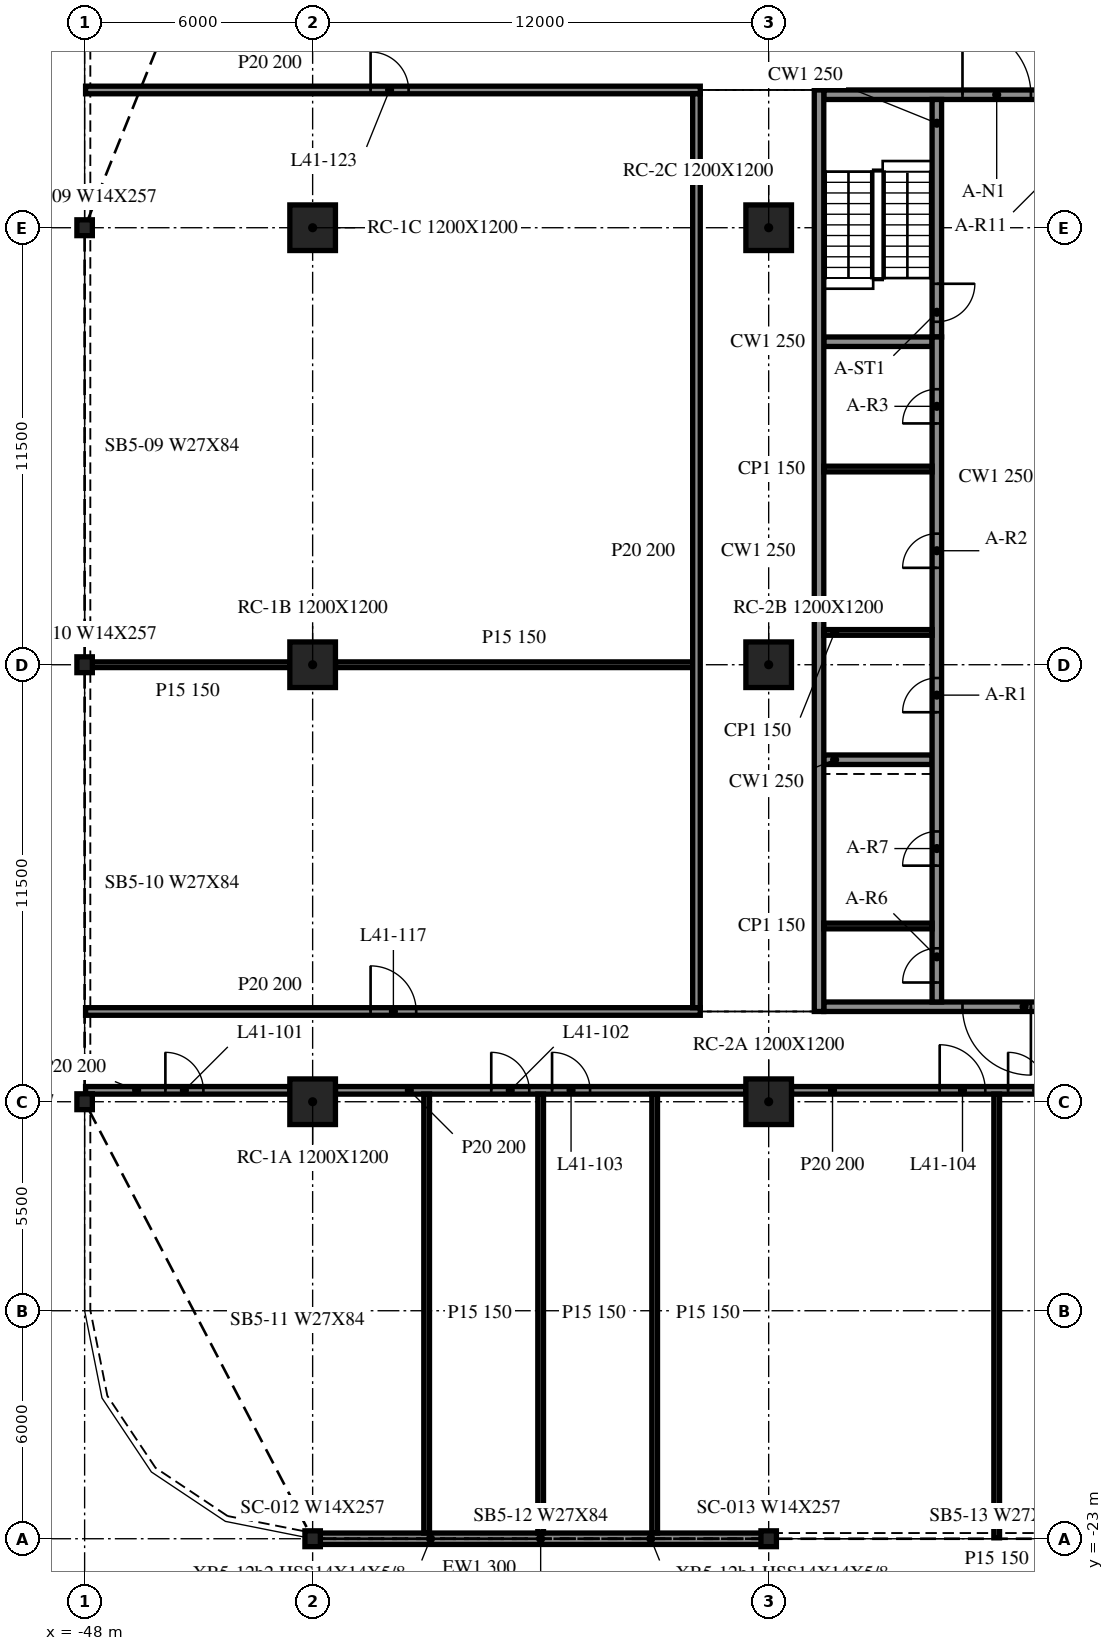
"""IFC4 building model, lengths in metres.
Left out: names, types, materials, properties, quantities, classifications, styles, units other than length and angle.
Written with IfcOpenShell. Run it as: python <this file> out.ifc"""

import sys

from ifc_helpers import new_model, si_unit, direction, frame, frame_2d, origin, origin_2d, place, context, subcontext, project, spatial, rectangle, i_section, extrude, element, fill, save


model = new_model("IFC4")
c1 = context("Model", 3, precision=1e-05, world=origin(), true_north=direction((0.0, 1.0)))
c2 = subcontext(c1, "Body", "Model", "MODEL_VIEW")
j1 = project(units=[si_unit("LENGTHUNIT", "METRE"), si_unit("PLANEANGLEUNIT", "RADIAN")], contexts=[c1])
p1 = place(None, origin())
s1 = spatial("IfcSite", under=j1, at=p1, CompositionType="ELEMENT")
p2 = place(p1, origin())
s2 = spatial("IfcBuilding", under=s1, at=p2, CompositionType="ELEMENT")
p3 = place(p2, frame((0.0, 0.0, 174.4)))
s3 = spatial("IfcBuildingStorey", under=s2, at=p3, CompositionType="ELEMENT", Elevation=174.4)
for number, where, z_axis, x_axis in (
    (1, (-42.0, -11.5, -0.34), (0.0, 0.0, 1.0), (1.0, 0.0, 0.0)),
    (2, (-42.0, 0.0, -0.34), (0.0, 0.0, 1.0), (1.0, 0.0, 0.0)),
    (3, (-42.0, 11.5, -0.34), (0.0, 0.0, 1.0), (1.0, 0.0, 0.0)),
    (4, (-30.0, -11.5, -0.34), (0.0, 0.0, 1.0), (1.0, 0.0, 0.0)),
    (5, (-30.0, 0.0, -0.34), (0.0, 0.0, 1.0), (1.0, 0.0, 0.0)),
    (6, (-30.0, 11.5, -0.34), (0.0, 0.0, 1.0), (1.0, 0.0, 0.0)),
):
    element("IfcColumn", number, at=place(p3, frame(where, z_axis=z_axis, x_axis=x_axis)), inside=s3, PredefinedType="COLUMN", context=c2, shape_type="SweptSolid", body=[
        extrude(rectangle(XDim=1.2, YDim=1.2, at=origin_2d()), origin(), (0.0, 0.0, 1.0), 3.8),
    ])
for number, where, z_axis, x_axis in (
    (7, (-48.0, 11.5, -0.34), (0.0, 0.0, 1.0), (1.0, 0.0, 0.0)),
    (8, (-48.0, 0.0, -0.34), (0.0, 0.0, 1.0), (1.0, 0.0, 0.0)),
    (9, (-48.0, -11.5, -0.34), (0.0, 0.0, 1.0), (1.0, 0.0, 0.0)),
    (10, (-42.0, -23.0, -0.34), (0.0, 0.0, 1.0), (1.0, 0.0, 0.0)),
    (11, (-30.0, -23.0, -0.34), (0.0, 0.0, 1.0), (1.0, 0.0, 0.0)),
):
    element("IfcColumn", number, at=place(p3, frame(where, z_axis=z_axis, x_axis=x_axis)), inside=s3, PredefinedType="COLUMN", context=c2, shape_type="SweptSolid", body=[
        extrude(i_section(OverallWidth=0.406, OverallDepth=0.417, WebThickness=0.03, FlangeThickness=0.048, at=origin_2d()), origin(), (0.0, 0.0, 1.0), 3.8),
    ])
p4 = place(p3, frame((-41.985, -23.0, 0.0), z_axis=(0.0, 0.0, 1.0), x_axis=(1.0, 0.0, 0.0)))
e12 = element("IfcWall", 12, at=p4, inside=s3, PredefinedType="NOTDEFINED", context=c2, shape_type="SweptSolid", body=[
    extrude(rectangle(XDim=11.97, YDim=0.3, at=frame_2d((5.985, 0.0))), origin(), (0.0, 0.0, 1.0), 2.782),
])
p5 = place(p3, frame((-28.675, 15.125, 0.0), z_axis=(0.0, 0.0, 1.0), x_axis=(0.0, -1.0, 0.0)))
e13 = element("IfcWall", 13, at=p5, inside=s3, PredefinedType="SOLIDWALL", context=c2, shape_type="SweptSolid", body=[
    extrude(rectangle(XDim=24.25, YDim=0.25, at=frame_2d((12.125, 0.0))), origin(), (0.0, 0.0, 1.0), 3.46),
])
p6 = place(p3, frame((-19.45, -9.0, 0.0), z_axis=(0.0, 0.0, 1.0), x_axis=(-1.0, 0.0, 0.0)))
e14 = element("IfcWall", 14, at=p6, inside=s3, PredefinedType="SOLIDWALL", context=c2, shape_type="SweptSolid", body=[
    extrude(rectangle(XDim=9.1, YDim=0.25, at=frame_2d((4.55, 0.0))), origin(), (0.0, 0.0, 1.0), 3.46),
])
p7 = place(p6, frame((3.65, 0.0, 0.0)))
e15 = element("IfcOpeningElement", 15, at=p7, cuts=e14, PredefinedType="OPENING", context=c2, shape_type="SweptSolid", body=[
    extrude(rectangle(XDim=1.8, YDim=2.1, at=frame_2d((0.9, 1.05))), frame((0.0, 0.135, 0.0), z_axis=(0.0, -1.0, 0.0), x_axis=(1.0, 0.0, 0.0)), (0.0, 0.0, 1.0), 0.27),
])
p8 = place(p3, frame((-28.55, 15.0, 0.0), z_axis=(0.0, 0.0, 1.0), x_axis=(1.0, 0.0, 0.0)))
e16 = element("IfcWall", 16, at=p8, inside=s3, PredefinedType="SOLIDWALL", context=c2, shape_type="SweptSolid", body=[
    extrude(rectangle(XDim=9.1, YDim=0.25, at=frame_2d((4.55, 0.0))), origin(), (0.0, 0.0, 1.0), 3.46),
])
p9 = place(p8, frame((3.65, 0.0, 0.0)))
e17 = element("IfcOpeningElement", 17, at=p9, cuts=e16, PredefinedType="OPENING", context=c2, shape_type="SweptSolid", body=[
    extrude(rectangle(XDim=1.8, YDim=2.1, at=frame_2d((0.9, 1.05))), frame((0.0, 0.135, 0.0), z_axis=(0.0, -1.0, 0.0), x_axis=(1.0, 0.0, 0.0)), (0.0, 0.0, 1.0), 0.27),
])
p10 = place(p3, frame((-25.575, -8.875, 0.0), z_axis=(0.0, 0.0, 1.0), x_axis=(0.0, 1.0, 0.0)))
e18 = element("IfcWall", 18, at=p10, inside=s3, PredefinedType="SOLIDWALL", context=c2, shape_type="SweptSolid", body=[
    extrude(rectangle(XDim=17.5, YDim=0.25, at=frame_2d((8.75, 0.0))), origin(), (0.0, 0.0, 1.0), 3.46),
])
p11 = place(p10, frame((7.625, 0.0, 0.0)))
e19 = element("IfcOpeningElement", 19, at=p11, cuts=e18, PredefinedType="OPENING", context=c2, shape_type="SweptSolid", body=[
    extrude(rectangle(XDim=0.9, YDim=2.1, at=frame_2d((0.45, 1.05))), frame((0.0, 0.135, 0.0), z_axis=(0.0, -1.0, 0.0), x_axis=(1.0, 0.0, 0.0)), (0.0, 0.0, 1.0), 0.27),
])
p12 = place(p10, frame((11.425, 0.0, 0.0)))
e20 = element("IfcOpeningElement", 20, at=p12, cuts=e18, PredefinedType="OPENING", context=c2, shape_type="SweptSolid", body=[
    extrude(rectangle(XDim=0.9, YDim=2.1, at=frame_2d((0.45, 1.05))), frame((0.0, 0.135, 0.0), z_axis=(0.0, -1.0, 0.0), x_axis=(1.0, 0.0, 0.0)), (0.0, 0.0, 1.0), 0.27),
])
p13 = place(p10, frame((15.225, 0.0, 0.0)))
e21 = element("IfcOpeningElement", 21, at=p13, cuts=e18, PredefinedType="OPENING", context=c2, shape_type="SweptSolid", body=[
    extrude(rectangle(XDim=0.9, YDim=2.1, at=frame_2d((0.45, 1.05))), frame((0.0, 0.135, 0.0), z_axis=(0.0, -1.0, 0.0), x_axis=(1.0, 0.0, 0.0)), (0.0, 0.0, 1.0), 0.27),
])
p14 = place(p10, frame((0.512, 0.0, 0.0)))
e22 = element("IfcOpeningElement", 22, at=p14, cuts=e18, PredefinedType="OPENING", context=c2, shape_type="SweptSolid", body=[
    extrude(rectangle(XDim=0.9, YDim=2.1, at=frame_2d((0.45, 1.05))), frame((0.0, 0.135, 0.0), z_axis=(0.0, -1.0, 0.0), x_axis=(1.0, 0.0, 0.0)), (0.0, 0.0, 1.0), 0.27),
])
p15 = place(p10, frame((3.587, 0.0, 0.0)))
e23 = element("IfcOpeningElement", 23, at=p15, cuts=e18, PredefinedType="OPENING", context=c2, shape_type="SweptSolid", body=[
    extrude(rectangle(XDim=0.9, YDim=2.1, at=frame_2d((0.45, 1.05))), frame((0.0, 0.135, 0.0), z_axis=(0.0, -1.0, 0.0), x_axis=(1.0, 0.0, 0.0)), (0.0, 0.0, 1.0), 0.27),
])
p16 = place(p3, frame((-25.575, 14.875, 0.0), z_axis=(0.0, 0.0, 1.0), x_axis=(0.0, -1.0, 0.0)))
e24 = element("IfcWall", 24, at=p16, inside=s3, PredefinedType="SOLIDWALL", context=c2, shape_type="SweptSolid", body=[
    extrude(rectangle(XDim=6.25, YDim=0.25, at=frame_2d((3.125, 0.0))), origin(), (0.0, 0.0, 1.0), 3.46),
])
p17 = place(p16, frame((4.85, 0.0, 0.0)))
e25 = element("IfcOpeningElement", 25, at=p17, cuts=e24, PredefinedType="OPENING", context=c2, shape_type="SweptSolid", body=[
    extrude(rectangle(XDim=1.0, YDim=2.1, at=frame_2d((0.5, 1.05))), frame((0.0, 0.135, 0.0), z_axis=(0.0, -1.0, 0.0), x_axis=(1.0, 0.0, 0.0)), (0.0, 0.0, 1.0), 0.27),
])
for number, where, z_axis, x_axis in (
    (26, (-28.55, -2.5, 0.0), (0.0, 0.0, 1.0), (1.0, 0.0, 0.0)),
    (27, (-28.55, 8.5, 0.0), (0.0, 0.0, 1.0), (1.0, 0.0, 0.0)),
):
    element("IfcWall", number, at=place(p3, frame(where, z_axis=z_axis, x_axis=x_axis)), inside=s3, PredefinedType="SOLIDWALL", context=c2, shape_type="SweptSolid", body=[
        extrude(rectangle(XDim=2.85, YDim=0.25, at=frame_2d((1.425, 0.0))), origin(), (0.0, 0.0, 1.0), 3.46),
    ])
for number, where, z_axis, x_axis in (
    (28, (-28.55, 0.85, 0.0), (0.0, 0.0, 1.0), (1.0, 0.0, 0.0)),
    (29, (-28.55, 5.15, 0.0), (0.0, 0.0, 1.0), (1.0, 0.0, 0.0)),
    (30, (-28.55, -6.875, 0.0), (0.0, 0.0, 1.0), (1.0, 0.0, 0.0)),
):
    element("IfcWall", number, at=place(p3, frame(where, z_axis=z_axis, x_axis=x_axis)), inside=s3, PredefinedType="PARTITIONING", context=c2, shape_type="SweptSolid", body=[
        extrude(rectangle(XDim=2.85, YDim=0.15, at=frame_2d((1.425, 0.0))), origin(), (0.0, 0.0, 1.0), 3.46),
    ])
p18 = place(p3, frame((-47.975, -11.2, 0.0), z_axis=(0.0, 0.0, 1.0), x_axis=(1.0, 0.0, 0.0)))
e31 = element("IfcWall", 31, at=p18, inside=s3, PredefinedType="PARTITIONING", context=c2, shape_type="SweptSolid", body=[
    extrude(rectangle(XDim=5.375, YDim=0.2, at=frame_2d((2.688, 0.0))), origin(), (0.0, 0.0, 1.0), 3.46),
])
p19 = place(p18, frame((2.1, 0.0, 0.0)))
e32 = element("IfcOpeningElement", 32, at=p19, cuts=e31, PredefinedType="OPENING", context=c2, shape_type="SweptSolid", body=[
    extrude(rectangle(XDim=1.0, YDim=2.1, at=frame_2d((0.5, 1.05))), frame((0.0, 0.11, 0.0), z_axis=(0.0, -1.0, 0.0), x_axis=(1.0, 0.0, 0.0)), (0.0, 0.0, 1.0), 0.22),
])
p20 = place(p3, frame((-41.4, -11.2, 0.0), z_axis=(0.0, 0.0, 1.0), x_axis=(1.0, 0.0, 0.0)))
e33 = element("IfcWall", 33, at=p20, inside=s3, PredefinedType="PARTITIONING", context=c2, shape_type="SweptSolid", body=[
    extrude(rectangle(XDim=10.8, YDim=0.2, at=frame_2d((5.4, 0.0))), origin(), (0.0, 0.0, 1.0), 3.46),
])
p21 = place(p20, frame((4.1, 0.0, 0.0)))
e34 = element("IfcOpeningElement", 34, at=p21, cuts=e33, PredefinedType="OPENING", context=c2, shape_type="SweptSolid", body=[
    extrude(rectangle(XDim=1.0, YDim=2.1, at=frame_2d((0.5, 1.05))), frame((0.0, 0.11, 0.0), z_axis=(0.0, -1.0, 0.0), x_axis=(1.0, 0.0, 0.0)), (0.0, 0.0, 1.0), 0.22),
])
p22 = place(p20, frame((5.7, 0.0, 0.0)))
e35 = element("IfcOpeningElement", 35, at=p22, cuts=e33, PredefinedType="OPENING", context=c2, shape_type="SweptSolid", body=[
    extrude(rectangle(XDim=1.0, YDim=2.1, at=frame_2d((0.5, 1.05))), frame((0.0, 0.11, 0.0), z_axis=(0.0, -1.0, 0.0), x_axis=(1.0, 0.0, 0.0)), (0.0, 0.0, 1.0), 0.22),
])
p23 = place(p3, frame((-29.4, -11.2, 0.0), z_axis=(0.0, 0.0, 1.0), x_axis=(1.0, 0.0, 0.0)))
e36 = element("IfcWall", 36, at=p23, inside=s3, PredefinedType="PARTITIONING", context=c2, shape_type="SweptSolid", body=[
    extrude(rectangle(XDim=10.8, YDim=0.2, at=frame_2d((5.4, 0.0))), origin(), (0.0, 0.0, 1.0), 3.46),
])
p24 = place(p23, frame((3.9, 0.0, 0.0)))
e37 = element("IfcOpeningElement", 37, at=p24, cuts=e36, PredefinedType="OPENING", context=c2, shape_type="SweptSolid", body=[
    extrude(rectangle(XDim=1.2, YDim=2.1, at=frame_2d((0.6, 1.05))), frame((0.0, 0.11, 0.0), z_axis=(0.0, -1.0, 0.0), x_axis=(1.0, 0.0, 0.0)), (0.0, 0.0, 1.0), 0.22),
])
p25 = place(p23, frame((5.7, 0.0, 0.0)))
e38 = element("IfcOpeningElement", 38, at=p25, cuts=e36, PredefinedType="OPENING", context=c2, shape_type="SweptSolid", body=[
    extrude(rectangle(XDim=1.0, YDim=2.1, at=frame_2d((0.5, 1.05))), frame((0.0, 0.11, 0.0), z_axis=(0.0, -1.0, 0.0), x_axis=(1.0, 0.0, 0.0)), (0.0, 0.0, 1.0), 0.22),
])
p26 = place(p3, frame((-47.975, -9.125, 0.0), z_axis=(0.0, 0.0, 1.0), x_axis=(1.0, 0.0, 0.0)))
e39 = element("IfcWall", 39, at=p26, inside=s3, PredefinedType="PARTITIONING", context=c2, shape_type="SweptSolid", body=[
    extrude(rectangle(XDim=16.175, YDim=0.2, at=frame_2d((8.087, 0.0))), origin(), (0.0, 0.0, 1.0), 3.46),
])
p27 = place(p26, frame((7.5, 0.0, 0.0)))
e40 = element("IfcOpeningElement", 40, at=p27, cuts=e39, PredefinedType="OPENING", context=c2, shape_type="SweptSolid", body=[
    extrude(rectangle(XDim=1.2, YDim=2.1, at=frame_2d((0.6, 1.05))), frame((0.0, 0.11, 0.0), z_axis=(0.0, -1.0, 0.0), x_axis=(1.0, 0.0, 0.0)), (0.0, 0.0, 1.0), 0.22),
])
p28 = place(p3, frame((-47.975, 0.0, 0.0), z_axis=(0.0, 0.0, 1.0), x_axis=(1.0, 0.0, 0.0)))
e41 = element("IfcWall", 41, at=p28, inside=s3, PredefinedType="PARTITIONING", context=c2, shape_type="SweptSolid", body=[
    extrude(rectangle(XDim=5.375, YDim=0.15, at=frame_2d((2.688, 0.0))), origin(), (0.0, 0.0, 1.0), 3.46),
])
p29 = place(p3, frame((-41.4, 0.0, 0.0), z_axis=(0.0, 0.0, 1.0), x_axis=(1.0, 0.0, 0.0)))
e42 = element("IfcWall", 42, at=p29, inside=s3, PredefinedType="PARTITIONING", context=c2, shape_type="SweptSolid", body=[
    extrude(rectangle(XDim=9.4, YDim=0.15, at=frame_2d((4.7, 0.0))), origin(), (0.0, 0.0, 1.0), 3.46),
])
p30 = place(p3, frame((-47.975, 15.125, 0.0), z_axis=(0.0, 0.0, 1.0), x_axis=(1.0, 0.0, 0.0)))
e43 = element("IfcWall", 43, at=p30, inside=s3, PredefinedType="PARTITIONING", context=c2, shape_type="SweptSolid", body=[
    extrude(rectangle(XDim=16.175, YDim=0.2, at=frame_2d((8.087, 0.0))), origin(), (0.0, 0.0, 1.0), 3.46),
])
p31 = place(p30, frame((7.5, 0.0, 0.0)))
e44 = element("IfcOpeningElement", 44, at=p31, cuts=e43, PredefinedType="OPENING", context=c2, shape_type="SweptSolid", body=[
    extrude(rectangle(XDim=1.0, YDim=2.1, at=frame_2d((0.5, 1.05))), frame((0.0, 0.11, 0.0), z_axis=(0.0, -1.0, 0.0), x_axis=(1.0, 0.0, 0.0)), (0.0, 0.0, 1.0), 0.22),
])
for number, where, z_axis, x_axis in (
    (45, (-39.0, -22.85, 0.0), (0.0, 0.0, 1.0), (0.0, 1.0, 0.0)),
    (46, (-36.0, -22.85, 0.0), (0.0, 0.0, 1.0), (0.0, 1.0, 0.0)),
    (47, (-33.0, -22.85, 0.0), (0.0, 0.0, 1.0), (0.0, 1.0, 0.0)),
):
    element("IfcWall", number, at=place(p3, frame(where, z_axis=z_axis, x_axis=x_axis)), inside=s3, PredefinedType="PARTITIONING", context=c2, shape_type="SweptSolid", body=[
        extrude(rectangle(XDim=11.55, YDim=0.15, at=frame_2d((5.775, 0.0))), origin(), (0.0, 0.0, 1.0), 3.46),
    ])
p32 = place(p3, frame((-31.9, -9.025, 0.0), z_axis=(0.0, 0.0, 1.0), x_axis=(0.0, 1.0, 0.0)))
e48 = element("IfcWall", 48, at=p32, inside=s3, PredefinedType="PARTITIONING", context=c2, shape_type="SweptSolid", body=[
    extrude(rectangle(XDim=24.05, YDim=0.2, at=frame_2d((12.025, 0.0))), origin(), (0.0, 0.0, 1.0), 3.46),
])
p33 = place(p3, frame((-24.0, -22.975, 0.0), z_axis=(0.0, 0.0, 1.0), x_axis=(0.0, 1.0, 0.0)))
e49 = element("IfcWall", 49, at=p33, inside=s3, PredefinedType="PARTITIONING", context=c2, shape_type="SweptSolid", body=[
    extrude(rectangle(XDim=11.675, YDim=0.15, at=frame_2d((5.837, 0.0))), origin(), (0.0, 0.0, 1.0), 3.46),
])
p34 = place(p7, origin())
e50 = element("IfcDoor", 50, at=p34, inside=s3, OperationType="DOUBLE_DOOR_SINGLE_SWING", PredefinedType="DOOR", context=c2, shape_type="SweptSolid", body=[
    extrude(rectangle(XDim=1.8, YDim=2.1, at=frame_2d((0.9, 1.05))), frame((0.0, 0.025, 0.0), z_axis=(0.0, -1.0, 0.0), x_axis=(1.0, 0.0, 0.0)), (0.0, 0.0, 1.0), 0.05),
])
fill(e15, e50)
p35 = place(p9, origin())
e51 = element("IfcDoor", 51, at=p35, inside=s3, OperationType="DOUBLE_DOOR_SINGLE_SWING", PredefinedType="DOOR", context=c2, shape_type="SweptSolid", body=[
    extrude(rectangle(XDim=1.8, YDim=2.1, at=frame_2d((0.9, 1.05))), frame((0.0, 0.025, 0.0), z_axis=(0.0, -1.0, 0.0), x_axis=(1.0, 0.0, 0.0)), (0.0, 0.0, 1.0), 0.05),
])
fill(e17, e51)
p36 = place(p11, origin())
e52 = element("IfcDoor", 52, at=p36, inside=s3, OperationType="SINGLE_SWING_LEFT", PredefinedType="DOOR", context=c2, shape_type="SweptSolid", body=[
    extrude(rectangle(XDim=0.9, YDim=2.1, at=frame_2d((0.45, 1.05))), frame((0.0, 0.025, 0.0), z_axis=(0.0, -1.0, 0.0), x_axis=(1.0, 0.0, 0.0)), (0.0, 0.0, 1.0), 0.05),
])
fill(e19, e52)
p37 = place(p12, origin())
e53 = element("IfcDoor", 53, at=p37, inside=s3, OperationType="SINGLE_SWING_RIGHT", PredefinedType="DOOR", context=c2, shape_type="SweptSolid", body=[
    extrude(rectangle(XDim=0.9, YDim=2.1, at=frame_2d((0.45, 1.05))), frame((0.0, 0.025, 0.0), z_axis=(0.0, -1.0, 0.0), x_axis=(1.0, 0.0, 0.0)), (0.0, 0.0, 1.0), 0.05),
])
fill(e20, e53)
p38 = place(p13, origin())
e54 = element("IfcDoor", 54, at=p38, inside=s3, OperationType="SINGLE_SWING_LEFT", PredefinedType="DOOR", context=c2, shape_type="SweptSolid", body=[
    extrude(rectangle(XDim=0.9, YDim=2.1, at=frame_2d((0.45, 1.05))), frame((0.0, 0.025, 0.0), z_axis=(0.0, -1.0, 0.0), x_axis=(1.0, 0.0, 0.0)), (0.0, 0.0, 1.0), 0.05),
])
fill(e21, e54)
p39 = place(p14, origin())
e55 = element("IfcDoor", 55, at=p39, inside=s3, OperationType="SINGLE_SWING_RIGHT", PredefinedType="DOOR", context=c2, shape_type="SweptSolid", body=[
    extrude(rectangle(XDim=0.9, YDim=2.1, at=frame_2d((0.45, 1.05))), frame((0.0, 0.025, 0.0), z_axis=(0.0, -1.0, 0.0), x_axis=(1.0, 0.0, 0.0)), (0.0, 0.0, 1.0), 0.05),
])
fill(e22, e55)
p40 = place(p15, origin())
e56 = element("IfcDoor", 56, at=p40, inside=s3, OperationType="SINGLE_SWING_LEFT", PredefinedType="DOOR", context=c2, shape_type="SweptSolid", body=[
    extrude(rectangle(XDim=0.9, YDim=2.1, at=frame_2d((0.45, 1.05))), frame((0.0, 0.025, 0.0), z_axis=(0.0, -1.0, 0.0), x_axis=(1.0, 0.0, 0.0)), (0.0, 0.0, 1.0), 0.05),
])
fill(e23, e56)
p41 = place(p17, origin())
e57 = element("IfcDoor", 57, at=p41, inside=s3, OperationType="SINGLE_SWING_RIGHT", PredefinedType="DOOR", context=c2, shape_type="SweptSolid", body=[
    extrude(rectangle(XDim=1.0, YDim=2.1, at=frame_2d((0.5, 1.05))), frame((0.0, 0.025, 0.0), z_axis=(0.0, -1.0, 0.0), x_axis=(1.0, 0.0, 0.0)), (0.0, 0.0, 1.0), 0.05),
])
fill(e25, e57)
p42 = place(p19, origin())
e58 = element("IfcDoor", 58, at=p42, inside=s3, OperationType="SINGLE_SWING_RIGHT", PredefinedType="DOOR", context=c2, shape_type="SweptSolid", body=[
    extrude(rectangle(XDim=1.0, YDim=2.1, at=frame_2d((0.5, 1.05))), frame((0.0, 0.025, 0.0), z_axis=(0.0, -1.0, 0.0), x_axis=(1.0, 0.0, 0.0)), (0.0, 0.0, 1.0), 0.05),
])
fill(e32, e58)
p43 = place(p21, origin())
e59 = element("IfcDoor", 59, at=p43, inside=s3, OperationType="SINGLE_SWING_RIGHT", PredefinedType="DOOR", context=c2, shape_type="SweptSolid", body=[
    extrude(rectangle(XDim=1.0, YDim=2.1, at=frame_2d((0.5, 1.05))), frame((0.0, 0.025, 0.0), z_axis=(0.0, -1.0, 0.0), x_axis=(1.0, 0.0, 0.0)), (0.0, 0.0, 1.0), 0.05),
])
fill(e34, e59)
p44 = place(p22, origin())
e60 = element("IfcDoor", 60, at=p44, inside=s3, OperationType="SINGLE_SWING_LEFT", PredefinedType="DOOR", context=c2, shape_type="SweptSolid", body=[
    extrude(rectangle(XDim=1.0, YDim=2.1, at=frame_2d((0.5, 1.05))), frame((0.0, 0.025, 0.0), z_axis=(0.0, -1.0, 0.0), x_axis=(1.0, 0.0, 0.0)), (0.0, 0.0, 1.0), 0.05),
])
fill(e35, e60)
p45 = place(p24, origin())
e61 = element("IfcDoor", 61, at=p45, inside=s3, OperationType="SINGLE_SWING_RIGHT", PredefinedType="DOOR", context=c2, shape_type="SweptSolid", body=[
    extrude(rectangle(XDim=1.2, YDim=2.1, at=frame_2d((0.6, 1.05))), frame((0.0, 0.025, 0.0), z_axis=(0.0, -1.0, 0.0), x_axis=(1.0, 0.0, 0.0)), (0.0, 0.0, 1.0), 0.05),
])
fill(e37, e61)
p46 = place(p25, origin())
e62 = element("IfcDoor", 62, at=p46, inside=s3, OperationType="SINGLE_SWING_LEFT", PredefinedType="DOOR", context=c2, shape_type="SweptSolid", body=[
    extrude(rectangle(XDim=1.0, YDim=2.1, at=frame_2d((0.5, 1.05))), frame((0.0, 0.025, 0.0), z_axis=(0.0, -1.0, 0.0), x_axis=(1.0, 0.0, 0.0)), (0.0, 0.0, 1.0), 0.05),
])
fill(e38, e62)
p47 = place(p27, origin())
e63 = element("IfcDoor", 63, at=p47, inside=s3, OperationType="SINGLE_SWING_RIGHT", PredefinedType="DOOR", context=c2, shape_type="SweptSolid", body=[
    extrude(rectangle(XDim=1.2, YDim=2.1, at=frame_2d((0.6, 1.05))), frame((0.0, 0.025, 0.0), z_axis=(0.0, -1.0, 0.0), x_axis=(1.0, 0.0, 0.0)), (0.0, 0.0, 1.0), 0.05),
])
fill(e40, e63)
p48 = place(p31, origin())
e64 = element("IfcDoor", 64, at=p48, inside=s3, OperationType="SINGLE_SWING_RIGHT", PredefinedType="DOOR", context=c2, shape_type="SweptSolid", body=[
    extrude(rectangle(XDim=1.0, YDim=2.1, at=frame_2d((0.5, 1.05))), frame((0.0, 0.025, 0.0), z_axis=(0.0, -1.0, 0.0), x_axis=(1.0, 0.0, 0.0)), (0.0, 0.0, 1.0), 0.05),
])
fill(e44, e64)
save(model, sys.argv[1])
